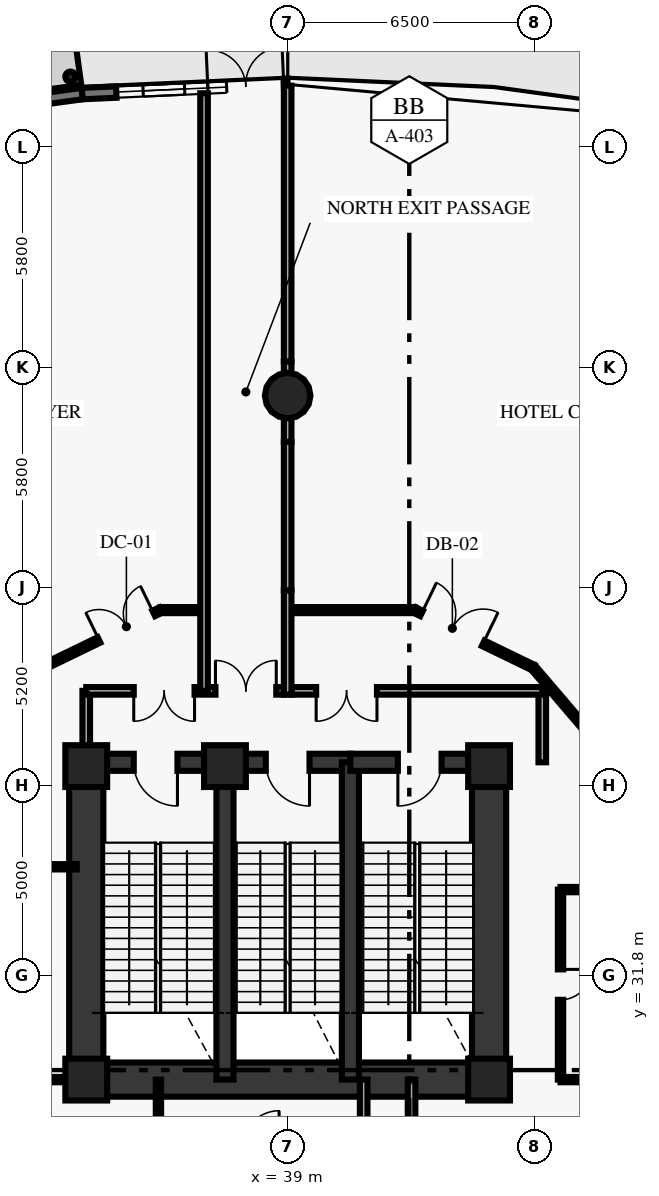
"""IFC4 building model, lengths in metres.
Left out: names, types, materials, properties, quantities, classifications, styles, units other than length and angle.
Written with IfcOpenShell. Run it as: python <this file> out.ifc"""

import sys

from ifc_helpers import new_model, si_unit, direction, frame, frame_2d, origin, origin_2d, place, context, subcontext, project, spatial, rectangle, circle, hollow_circle, extrude, element, fill, save


model = new_model("IFC4")
c1 = context("Model", 3, precision=1e-05, world=origin(), true_north=direction((0.0, 1.0)))
c2 = subcontext(c1, "Body", "Model", "MODEL_VIEW")
j1 = project(units=[si_unit("LENGTHUNIT", "METRE"), si_unit("PLANEANGLEUNIT", "RADIAN")], contexts=[c1])
p1 = place(None, origin())
s1 = spatial("IfcSite", under=j1, at=p1, CompositionType="ELEMENT")
p2 = place(p1, origin())
s2 = spatial("IfcBuilding", under=s1, at=p2, CompositionType="ELEMENT")
p3 = place(p2, origin())
s3 = spatial("IfcBuildingStorey", under=s2, at=p3, CompositionType="ELEMENT", Elevation=0.0)
for number, where, z_axis, x_axis in (
    (1, (44.3, 29.05, 0.0), (0.0, 0.0, 1.0), (1.0, 0.0, 0.0)),
    (2, (44.3, 37.3, 0.0), (0.0, 0.0, 1.0), (1.0, 0.0, 0.0)),
    (3, (37.35, 37.3, 0.0), (0.0, 0.0, 1.0), (1.0, 0.0, 0.0)),
    (4, (33.7, 37.3, 0.0), (0.0, 0.0, 1.0), (1.0, 0.0, 0.0)),
    (5, (33.7, 29.05, 0.0), (0.0, 0.0, 1.0), (1.0, 0.0, 0.0)),
):
    element("IfcColumn", number, at=place(p3, frame(where, z_axis=z_axis, x_axis=x_axis)), inside=s3, PredefinedType="PILASTER", context=c2, shape_type="SweptSolid", body=[
        extrude(rectangle(XDim=1.1, YDim=1.1, at=origin_2d()), origin(), (0.0, 0.0, 1.0), 5.7),
    ])
p4 = place(p3, frame((39.0, 47.05, 0.0), z_axis=(0.0, 0.0, 1.0), x_axis=(1.0, 0.0, 0.0)))
e6 = element("IfcColumn", 6, at=p4, inside=s3, PredefinedType="COLUMN", context=c2, shape_type="SweptSolid", body=[
    extrude(circle(Radius=0.6, at=origin_2d()), origin(), (0.0, 0.0, 1.0), 5.7),
])
for number, where, z_axis, x_axis in (
    (7, (33.7, 29.05, 0.0), (0.0, 0.0, 1.0), (0.0, 1.0, 0.0)),
    (8, (44.3, 29.05, 0.0), (0.0, 0.0, 1.0), (0.0, 1.0, 0.0)),
):
    element("IfcWall", number, at=place(p3, frame(where, z_axis=z_axis, x_axis=x_axis)), inside=s3, PredefinedType="SHEAR", context=c2, shape_type="SweptSolid", body=[
        extrude(rectangle(XDim=8.35, YDim=0.9, at=frame_2d((4.175, 0.0))), origin(), (0.0, 0.0, 1.0), 5.7),
    ])
p5 = place(p3, frame((33.7, 29.05, 0.0), z_axis=(0.0, 0.0, 1.0), x_axis=(1.0, 0.0, 0.0)))
e9 = element("IfcWall", 9, at=p5, inside=s3, PredefinedType="SHEAR", context=c2, shape_type="SweptSolid", body=[
    extrude(rectangle(XDim=10.6, YDim=0.9, at=frame_2d((5.3, 0.0))), origin(), (0.0, 0.0, 1.0), 5.7),
])
p6 = place(p3, frame((33.591, 54.997, 0.0), z_axis=(0.0, 0.0, 1.0), x_axis=(0.998993030562, 0.044865631479, 0.0)))
e10 = element("IfcWall", 10, at=p6, inside=s3, PredefinedType="STANDARD", context=c2, shape_type="SweptSolid", body=[
    extrude(rectangle(XDim=5.414, YDim=0.3, at=frame_2d((2.707, 0.0))), origin(), (0.0, 0.0, 1.0), 5.7),
])
p7 = place(p6, frame((0.9, 0.0, 0.9)))
e11 = element("IfcOpeningElement", 11, at=p7, cuts=e10, PredefinedType="OPENING", context=c2, shape_type="SweptSolid", body=[
    extrude(rectangle(XDim=1.8, YDim=2.4, at=frame_2d((0.9, 1.2))), frame((0.0, 0.16, 0.0), z_axis=(0.0, -1.0, 0.0), x_axis=(1.0, 0.0, 0.0)), (0.0, 0.0, 1.0), 0.32),
])
p8 = place(p6, frame((3.312, 0.0, 0.0)))
e12 = element("IfcOpeningElement", 12, at=p8, cuts=e10, PredefinedType="OPENING", context=c2, shape_type="SweptSolid", body=[
    extrude(rectangle(XDim=2.0, YDim=2.4, at=frame_2d((1.0, 1.2))), frame((0.0, 0.16, 0.0), z_axis=(0.0, -1.0, 0.0), x_axis=(1.0, 0.0, 0.0)), (0.0, 0.0, 1.0), 0.32),
])
p9 = place(p6, frame((1.607, 0.0, 3.4)))
e13 = element("IfcOpeningElement", 13, at=p9, cuts=e10, PredefinedType="OPENING", context=c2, shape_type="SweptSolid", body=[
    extrude(rectangle(XDim=2.2, YDim=1.3, at=frame_2d((1.1, 0.65))), frame((0.0, 0.16, 0.0), z_axis=(0.0, -1.0, 0.0), x_axis=(1.0, 0.0, 0.0)), (0.0, 0.0, 1.0), 0.32),
])
p10 = place(p3, frame((28.275, 54.271, 0.0), z_axis=(0.0, 0.0, 1.0), x_axis=(0.99080162659, 0.135322343857, 0.0)))
e14 = element("IfcWall", 14, at=p10, inside=s3, PredefinedType="STANDARD", context=c2, shape_type="SweptSolid", body=[
    extrude(rectangle(XDim=5.365, YDim=0.3, at=frame_2d((2.683, 0.0))), origin(), (0.0, 0.0, 1.0), 5.7),
])
p11 = place(p10, frame((1.683, 0.0, 0.0)))
e15 = element("IfcOpeningElement", 15, at=p11, cuts=e14, PredefinedType="OPENING", context=c2, shape_type="SweptSolid", body=[
    extrude(rectangle(XDim=2.0, YDim=2.4, at=frame_2d((1.0, 1.2))), frame((0.0, 0.16, 0.0), z_axis=(0.0, -1.0, 0.0), x_axis=(1.0, 0.0, 0.0)), (0.0, 0.0, 1.0), 0.32),
])
p12 = place(p10, frame((1.583, 0.0, 3.4)))
e16 = element("IfcOpeningElement", 16, at=p12, cuts=e14, PredefinedType="OPENING", context=c2, shape_type="SweptSolid", body=[
    extrude(rectangle(XDim=2.2, YDim=1.3, at=frame_2d((1.1, 0.65))), frame((0.0, 0.16, 0.0), z_axis=(0.0, -1.0, 0.0), x_axis=(1.0, 0.0, 0.0)), (0.0, 0.0, 1.0), 0.32),
])
p13 = place(p3, frame((33.286, 55.441, -0.22), z_axis=(0.0, 0.0, 1.0), x_axis=(1.0, 0.0, 0.0)))
e17 = element("IfcColumn", 17, at=p13, inside=s3, PredefinedType="COLUMN", context=c2, shape_type="SweptSolid", body=[
    extrude(hollow_circle(Radius=0.136, WallThickness=0.013, at=origin_2d()), origin(), (0.0, 0.0, 1.0), 3.47),
])
p14 = place(p3, frame((33.7, 37.4, 0.0), z_axis=(0.0, 0.0, 1.0), x_axis=(1.0, 0.0, 0.0)))
e18 = element("IfcWall", 18, at=p14, inside=s3, PredefinedType="SHEAR", context=c2, shape_type="SweptSolid", body=[
    extrude(rectangle(XDim=3.65, YDim=0.45, at=frame_2d((1.825, 0.0))), origin(), (0.0, 0.0, 1.0), 5.7),
])
p15 = place(p14, frame((1.25, 0.0, 0.0)))
e19 = element("IfcOpeningElement", 19, at=p15, cuts=e18, PredefinedType="OPENING", context=c2, shape_type="SweptSolid", body=[
    extrude(rectangle(XDim=1.15, YDim=2.15, at=frame_2d((0.575, 1.075))), frame((0.0, 0.235, 0.0), z_axis=(0.0, -1.0, 0.0), x_axis=(1.0, 0.0, 0.0)), (0.0, 0.0, 1.0), 0.47),
])
p16 = place(p3, frame((37.35, 29.05, 0.0), z_axis=(0.0, 0.0, 1.0), x_axis=(0.0, 1.0, 0.0)))
e20 = element("IfcWall", 20, at=p16, inside=s3, PredefinedType="SHEAR", context=c2, shape_type="SweptSolid", body=[
    extrude(rectangle(XDim=8.35, YDim=0.45, at=frame_2d((4.175, 0.0))), origin(), (0.0, 0.0, 1.0), 5.7),
])
p17 = place(p3, frame((37.35, 37.4, 0.0), z_axis=(0.0, 0.0, 1.0), x_axis=(1.0, 0.0, 0.0)))
e21 = element("IfcWall", 21, at=p17, inside=s3, PredefinedType="SHEAR", context=c2, shape_type="SweptSolid", body=[
    extrude(rectangle(XDim=3.3, YDim=0.45, at=frame_2d((1.65, 0.0))), origin(), (0.0, 0.0, 1.0), 5.7),
])
p18 = place(p17, frame((1.075, 0.0, 0.0)))
e22 = element("IfcOpeningElement", 22, at=p18, cuts=e21, PredefinedType="OPENING", context=c2, shape_type="SweptSolid", body=[
    extrude(rectangle(XDim=1.15, YDim=2.15, at=frame_2d((0.575, 1.075))), frame((0.0, 0.235, 0.0), z_axis=(0.0, -1.0, 0.0), x_axis=(1.0, 0.0, 0.0)), (0.0, 0.0, 1.0), 0.47),
])
p19 = place(p3, frame((40.65, 29.05, 0.0), z_axis=(0.0, 0.0, 1.0), x_axis=(0.0, 1.0, 0.0)))
e23 = element("IfcWall", 23, at=p19, inside=s3, PredefinedType="SHEAR", context=c2, shape_type="SweptSolid", body=[
    extrude(rectangle(XDim=8.35, YDim=0.45, at=frame_2d((4.175, 0.0))), origin(), (0.0, 0.0, 1.0), 5.7),
])
p20 = place(p3, frame((40.65, 37.4, 0.0), z_axis=(0.0, 0.0, 1.0), x_axis=(1.0, 0.0, 0.0)))
e24 = element("IfcWall", 24, at=p20, inside=s3, PredefinedType="SHEAR", context=c2, shape_type="SweptSolid", body=[
    extrude(rectangle(XDim=3.65, YDim=0.45, at=frame_2d((1.825, 0.0))), origin(), (0.0, 0.0, 1.0), 5.7),
])
p21 = place(p20, frame((1.25, 0.0, 0.0)))
e25 = element("IfcOpeningElement", 25, at=p21, cuts=e24, PredefinedType="OPENING", context=c2, shape_type="SweptSolid", body=[
    extrude(rectangle(XDim=1.15, YDim=2.15, at=frame_2d((0.575, 1.075))), frame((0.0, 0.235, 0.0), z_axis=(0.0, -1.0, 0.0), x_axis=(1.0, 0.0, 0.0)), (0.0, 0.0, 1.0), 0.47),
])
for number, where, z_axis, x_axis in (
    (26, (33.7, 37.4, 0.0), (0.0, 0.0, 1.0), (0.0, 1.0, 0.0)),
    (27, (45.7, 37.4, 0.0), (0.0, 0.0, 1.0), (0.0, 1.0, 0.0)),
):
    element("IfcWall", number, at=place(p3, frame(where, z_axis=z_axis, x_axis=x_axis)), inside=s3, PredefinedType="SOLIDWALL", context=c2, shape_type="SweptSolid", body=[
        extrude(rectangle(XDim=1.88, YDim=0.2, at=frame_2d((0.94, 0.0))), origin(), (0.0, 0.0, 1.0), 5.7),
    ])
p22 = place(p3, frame((33.7, 39.28, 0.0), z_axis=(0.0, 0.0, 1.0), x_axis=(1.0, 0.0, 0.0)))
e28 = element("IfcWall", 28, at=p22, inside=s3, PredefinedType="SOLIDWALL", context=c2, shape_type="SweptSolid", body=[
    extrude(rectangle(XDim=5.2, YDim=0.2, at=frame_2d((2.6, 0.0))), origin(), (0.0, 0.0, 1.0), 5.7),
])
p23 = place(p22, frame((1.25, 0.0, 0.0)))
e29 = element("IfcOpeningElement", 29, at=p23, cuts=e28, PredefinedType="OPENING", context=c2, shape_type="SweptSolid", body=[
    extrude(rectangle(XDim=1.6, YDim=2.2, at=frame_2d((0.8, 1.1))), frame((0.0, 0.11, 0.0), z_axis=(0.0, -1.0, 0.0), x_axis=(1.0, 0.0, 0.0)), (0.0, 0.0, 1.0), 0.22),
])
p24 = place(p22, frame((3.4, 0.0, 0.0)))
e30 = element("IfcOpeningElement", 30, at=p24, cuts=e28, PredefinedType="OPENING", context=c2, shape_type="SweptSolid", body=[
    extrude(rectangle(XDim=1.6, YDim=2.2, at=frame_2d((0.8, 1.1))), frame((0.0, 0.11, 0.0), z_axis=(0.0, -1.0, 0.0), x_axis=(1.0, 0.0, 0.0)), (0.0, 0.0, 1.0), 0.22),
])
p25 = place(p3, frame((39.1, 39.28, 0.0), z_axis=(0.0, 0.0, 1.0), x_axis=(1.0, 0.0, 0.0)))
e31 = element("IfcWall", 31, at=p25, inside=s3, PredefinedType="SOLIDWALL", context=c2, shape_type="SweptSolid", body=[
    extrude(rectangle(XDim=6.6, YDim=0.2, at=frame_2d((3.3, 0.0))), origin(), (0.0, 0.0, 1.0), 5.7),
])
p26 = place(p25, frame((0.65, 0.0, 0.0)))
e32 = element("IfcOpeningElement", 32, at=p26, cuts=e31, PredefinedType="OPENING", context=c2, shape_type="SweptSolid", body=[
    extrude(rectangle(XDim=1.6, YDim=2.2, at=frame_2d((0.8, 1.1))), frame((0.0, 0.11, 0.0), z_axis=(0.0, -1.0, 0.0), x_axis=(1.0, 0.0, 0.0)), (0.0, 0.0, 1.0), 0.22),
])
p27 = place(p3, frame((35.6, 27.28, 0.0), z_axis=(0.0, 0.0, 1.0), x_axis=(0.0, 1.0, 0.0)))
e33 = element("IfcWall", 33, at=p27, inside=s3, PredefinedType="PARTITIONING", context=c2, shape_type="SweptSolid", body=[
    extrude(rectangle(XDim=1.77, YDim=0.14, at=frame_2d((0.885, 0.0))), origin(), (0.0, 0.0, 1.0), 5.7),
])
for number, where, z_axis, x_axis in (
    (34, (41.0, 27.28, 0.0), (0.0, 0.0, 1.0), (0.0, 1.0, 0.0)),
    (35, (42.26, 27.28, 0.0), (0.0, 0.0, 1.0), (0.0, 1.0, 0.0)),
):
    element("IfcWall", number, at=place(p3, frame(where, z_axis=z_axis, x_axis=x_axis)), inside=s3, PredefinedType="SOLIDWALL", context=c2, shape_type="SweptSolid", body=[
        extrude(rectangle(XDim=1.77, YDim=0.2, at=frame_2d((0.885, 0.0))), origin(), (0.0, 0.0, 1.0), 5.7),
    ])
p28 = place(p3, frame((30.85, 29.05, 0.0), z_axis=(0.0, 0.0, 1.0), x_axis=(1.0, 0.0, 0.0)))
e36 = element("IfcWall", 36, at=p28, inside=s3, PredefinedType="PARTITIONING", context=c2, shape_type="SweptSolid", body=[
    extrude(rectangle(XDim=2.6, YDim=0.14, at=frame_2d((1.3, 0.0))), origin(), (0.0, 0.0, 1.0), 4.66),
])
p29 = place(p28, frame((0.9, 0.0, 0.0)))
e37 = element("IfcOpeningElement", 37, at=p29, cuts=e36, PredefinedType="OPENING", context=c2, shape_type="SweptSolid", body=[
    extrude(rectangle(XDim=0.8, YDim=2.05, at=frame_2d((0.4, 1.025))), frame((0.0, 0.08, 0.0), z_axis=(0.0, -1.0, 0.0), x_axis=(1.0, 0.0, 0.0)), (0.0, 0.0, 1.0), 0.16),
])
p30 = place(p3, frame((30.85, 34.65, 0.0), z_axis=(0.0, 0.0, 1.0), x_axis=(1.0, 0.0, 0.0)))
e38 = element("IfcWall", 38, at=p30, inside=s3, PredefinedType="PARTITIONING", context=c2, shape_type="SweptSolid", body=[
    extrude(rectangle(XDim=2.6, YDim=0.14, at=frame_2d((1.3, 0.0))), origin(), (0.0, 0.0, 1.0), 5.7),
])
p31 = place(p3, frame((46.18, 34.05, 0.0), z_axis=(0.0, 0.0, 1.0), x_axis=(0.0, -1.0, 0.0)))
e39 = element("IfcWall", 39, at=p31, inside=s3, PredefinedType="PARTITIONING", context=c2, shape_type="SweptSolid", body=[
    extrude(rectangle(XDim=5.0, YDim=0.14, at=frame_2d((2.5, 0.0))), origin(), (0.0, 0.0, 1.0), 5.7),
])
p32 = place(p31, frame((2.1, 0.0, 0.0)))
e40 = element("IfcOpeningElement", 40, at=p32, cuts=e39, PredefinedType="OPENING", context=c2, shape_type="SweptSolid", body=[
    extrude(rectangle(XDim=0.8, YDim=2.05, at=frame_2d((0.4, 1.025))), frame((0.0, 0.08, 0.0), z_axis=(0.0, -1.0, 0.0), x_axis=(1.0, 0.0, 0.0)), (0.0, 0.0, 1.0), 0.16),
])
p33 = place(p3, frame((46.18, 29.05, 0.0), z_axis=(0.0, 0.0, 1.0), x_axis=(1.0, 0.0, 0.0)))
e41 = element("IfcWall", 41, at=p33, inside=s3, PredefinedType="PARTITIONING", context=c2, shape_type="SweptSolid", body=[
    extrude(rectangle(XDim=0.59, YDim=0.14, at=frame_2d((0.295, 0.0))), origin(), (0.0, 0.0, 1.0), 4.66),
])
p34 = place(p3, frame((46.18, 34.05, 0.0), z_axis=(0.0, 0.0, 1.0), x_axis=(1.0, 0.0, 0.0)))
e42 = element("IfcWall", 42, at=p34, inside=s3, PredefinedType="PARTITIONING", context=c2, shape_type="SweptSolid", body=[
    extrude(rectangle(XDim=1.64, YDim=0.14, at=frame_2d((0.82, 0.0))), origin(), (0.0, 0.0, 1.0), 5.7),
])
p35 = place(p3, frame((50.189, 34.36, 0.0), z_axis=(0.0, 0.0, 1.0), x_axis=(-0.649652680018, 0.760231145998, 0.0)))
e43 = element("IfcWall", 43, at=p35, inside=s3, PredefinedType="PARTITIONING", context=c2, shape_type="SweptSolid", body=[
    extrude(rectangle(XDim=7.279, YDim=0.16, at=frame_2d((3.64, 0.0))), origin(), (0.0, 0.0, 1.0), 5.7),
])
p36 = place(p3, frame((42.344, 41.405, 0.0), z_axis=(0.0, 0.0, 1.0), x_axis=(0.899789784655, -0.436323668199, 0.0)))
e44 = element("IfcWall", 44, at=p36, inside=s3, PredefinedType="PARTITIONING", context=c2, shape_type="SweptSolid", body=[
    extrude(rectangle(XDim=3.463, YDim=0.16, at=frame_2d((1.731, 0.0))), origin(), (0.0, 0.0, 1.0), 5.7),
])
p37 = place(p36, frame((0.2, 0.0, 0.0)))
e45 = element("IfcOpeningElement", 45, at=p37, cuts=e44, PredefinedType="OPENING", context=c2, shape_type="SweptSolid", body=[
    extrude(rectangle(XDim=1.8, YDim=2.3, at=frame_2d((0.9, 1.15))), frame((0.0, 0.09, 0.0), z_axis=(0.0, -1.0, 0.0), x_axis=(1.0, 0.0, 0.0)), (0.0, 0.0, 1.0), 0.18),
])
p38 = place(p3, frame((32.54, 39.894, 0.0), z_axis=(0.0, 0.0, 1.0), x_axis=(0.899789784655, 0.436323668199, 0.0)))
e46 = element("IfcWall", 46, at=p38, inside=s3, PredefinedType="PARTITIONING", context=c2, shape_type="SweptSolid", body=[
    extrude(rectangle(XDim=3.463, YDim=0.16, at=frame_2d((1.731, 0.0))), origin(), (0.0, 0.0, 1.0), 5.7),
])
p39 = place(p38, frame((1.663, 0.0, 0.0)))
e47 = element("IfcOpeningElement", 47, at=p39, cuts=e46, PredefinedType="OPENING", context=c2, shape_type="SweptSolid", body=[
    extrude(rectangle(XDim=1.6, YDim=2.2, at=frame_2d((0.8, 1.1))), frame((0.0, 0.09, 0.0), z_axis=(0.0, -1.0, 0.0), x_axis=(1.0, 0.0, 0.0)), (0.0, 0.0, 1.0), 0.18),
])
p40 = place(p3, frame((39.0, 41.92, 0.0), z_axis=(0.0, 0.0, 1.0), x_axis=(0.0, 1.0, 0.0)))
e48 = element("IfcWall", 48, at=p40, inside=s3, PredefinedType="PARTITIONING", context=c2, shape_type="SweptSolid", body=[
    extrude(rectangle(XDim=3.913, YDim=0.2, at=frame_2d((1.957, 0.0))), origin(), (0.0, 0.0, 1.0), 5.7),
])
p41 = place(p3, frame((39.0, 45.833, 0.0), z_axis=(0.0, 0.0, 1.0), x_axis=(0.0, 1.0, 0.0)))
e49 = element("IfcWall", 49, at=p41, inside=s3, PredefinedType="PARTITIONING", context=c2, shape_type="SweptSolid", body=[
    extrude(rectangle(XDim=1.234, YDim=0.2, at=frame_2d((0.617, 0.0))), origin(), (0.0, 0.0, 1.0), 5.165),
])
p42 = place(p3, frame((39.0, 47.067, 0.0), z_axis=(0.0, 0.0, 1.0), x_axis=(0.0, 1.0, 0.0)))
e50 = element("IfcWall", 50, at=p42, inside=s3, PredefinedType="PARTITIONING", context=c2, shape_type="SweptSolid", body=[
    extrude(rectangle(XDim=0.883, YDim=0.2, at=frame_2d((0.441, 0.0))), origin(), (0.0, 0.0, 1.0), 5.7),
])
p43 = place(p3, frame((39.0, 47.95, 0.0), z_axis=(0.0, 0.0, 1.0), x_axis=(0.0, 1.0, 0.0)))
e51 = element("IfcWall", 51, at=p43, inside=s3, PredefinedType="PARTITIONING", context=c2, shape_type="SweptSolid", body=[
    extrude(rectangle(XDim=7.255, YDim=0.2, at=frame_2d((3.627, 0.0))), origin(), (0.0, 0.0, 1.0), 5.7),
])
p44 = place(p3, frame((42.344, 41.405, 0.0), z_axis=(0.0, 0.0, 1.0), x_axis=(-1.0, 0.0, 0.0)))
e52 = element("IfcWall", 52, at=p44, inside=s3, PredefinedType="PARTITIONING", context=c2, shape_type="SweptSolid", body=[
    extrude(rectangle(XDim=3.344, YDim=0.16, at=frame_2d((1.672, 0.0))), origin(), (0.0, 0.0, 1.0), 5.7),
])
p45 = place(p3, frame((36.8, 41.405, 0.0), z_axis=(0.0, 0.0, 1.0), x_axis=(-1.0, 0.0, 0.0)))
e53 = element("IfcWall", 53, at=p45, inside=s3, PredefinedType="PARTITIONING", context=c2, shape_type="SweptSolid", body=[
    extrude(rectangle(XDim=1.144, YDim=0.16, at=frame_2d((0.572, 0.0))), origin(), (0.0, 0.0, 1.0), 5.7),
])
p46 = place(p3, frame((39.0, 39.18, 0.0), z_axis=(0.0, 0.0, 1.0), x_axis=(0.0, 1.0, 0.0)))
e54 = element("IfcWall", 54, at=p46, inside=s3, PredefinedType="SOLIDWALL", context=c2, shape_type="SweptSolid", body=[
    extrude(rectangle(XDim=2.74, YDim=0.2, at=frame_2d((1.37, 0.0))), origin(), (0.0, 0.0, 1.0), 5.7),
])
p47 = place(p3, frame((36.8, 39.28, 0.0), z_axis=(0.0, 0.0, 1.0), x_axis=(0.0, 1.0, 0.0)))
e55 = element("IfcWall", 55, at=p47, inside=s3, PredefinedType="SOLIDWALL", context=c2, shape_type="SweptSolid", body=[
    extrude(rectangle(XDim=15.726, YDim=0.2, at=frame_2d((7.863, 0.0))), origin(), (0.0, 0.0, 1.0), 5.7),
])
p48 = place(p7, origin())
e56 = element("IfcWindow", 56, at=p48, inside=s3, PartitioningType="DOUBLE_PANEL_VERTICAL", PredefinedType="WINDOW", context=c2, shape_type="SweptSolid", body=[
    extrude(rectangle(XDim=1.8, YDim=2.4, at=frame_2d((0.9, 1.2))), frame((0.0, 0.03, 0.0), z_axis=(0.0, -1.0, 0.0), x_axis=(1.0, 0.0, 0.0)), (0.0, 0.0, 1.0), 0.06),
])
fill(e11, e56)
p49 = place(p8, origin())
e57 = element("IfcDoor", 57, at=p49, inside=s3, OperationType="DOUBLE_DOOR_SINGLE_SWING", PredefinedType="DOOR", context=c2, shape_type="SweptSolid", body=[
    extrude(rectangle(XDim=2.0, YDim=2.4, at=frame_2d((1.0, 1.2))), frame((0.0, 0.025, 0.0), z_axis=(0.0, -1.0, 0.0), x_axis=(1.0, 0.0, 0.0)), (0.0, 0.0, 1.0), 0.05),
])
fill(e12, e57)
p50 = place(p9, origin())
e58 = element("IfcWindow", 58, at=p50, inside=s3, PartitioningType="DOUBLE_PANEL_HORIZONTAL", PredefinedType="WINDOW", context=c2, shape_type="SweptSolid", body=[
    extrude(rectangle(XDim=2.2, YDim=1.3, at=frame_2d((1.1, 0.65))), frame((0.0, 0.03, 0.0), z_axis=(0.0, -1.0, 0.0), x_axis=(1.0, 0.0, 0.0)), (0.0, 0.0, 1.0), 0.06),
])
fill(e13, e58)
p51 = place(p15, origin())
e59 = element("IfcDoor", 59, at=p51, inside=s3, OperationType="SINGLE_SWING_RIGHT", PredefinedType="DOOR", context=c2, shape_type="SweptSolid", body=[
    extrude(rectangle(XDim=1.15, YDim=2.15, at=frame_2d((0.575, 1.075))), frame((0.0, 0.025, 0.0), z_axis=(0.0, -1.0, 0.0), x_axis=(1.0, 0.0, 0.0)), (0.0, 0.0, 1.0), 0.05),
])
fill(e19, e59)
p52 = place(p18, origin())
e60 = element("IfcDoor", 60, at=p52, inside=s3, OperationType="SINGLE_SWING_RIGHT", PredefinedType="DOOR", context=c2, shape_type="SweptSolid", body=[
    extrude(rectangle(XDim=1.15, YDim=2.15, at=frame_2d((0.575, 1.075))), frame((0.0, 0.025, 0.0), z_axis=(0.0, -1.0, 0.0), x_axis=(1.0, 0.0, 0.0)), (0.0, 0.0, 1.0), 0.05),
])
fill(e22, e60)
p53 = place(p21, origin())
e61 = element("IfcDoor", 61, at=p53, inside=s3, OperationType="SINGLE_SWING_LEFT", PredefinedType="DOOR", context=c2, shape_type="SweptSolid", body=[
    extrude(rectangle(XDim=1.15, YDim=2.15, at=frame_2d((0.575, 1.075))), frame((0.0, 0.025, 0.0), z_axis=(0.0, -1.0, 0.0), x_axis=(1.0, 0.0, 0.0)), (0.0, 0.0, 1.0), 0.05),
])
fill(e25, e61)
p54 = place(p23, origin())
e62 = element("IfcDoor", 62, at=p54, inside=s3, OperationType="DOUBLE_DOOR_SINGLE_SWING", PredefinedType="DOOR", context=c2, shape_type="SweptSolid", body=[
    extrude(rectangle(XDim=1.6, YDim=2.2, at=frame_2d((0.8, 1.1))), frame((0.0, 0.025, 0.0), z_axis=(0.0, -1.0, 0.0), x_axis=(1.0, 0.0, 0.0)), (0.0, 0.0, 1.0), 0.05),
])
fill(e29, e62)
p55 = place(p24, origin())
e63 = element("IfcDoor", 63, at=p55, inside=s3, OperationType="DOUBLE_DOOR_SINGLE_SWING", PredefinedType="DOOR", context=c2, shape_type="SweptSolid", body=[
    extrude(rectangle(XDim=1.6, YDim=2.2, at=frame_2d((0.8, 1.1))), frame((0.0, 0.025, 0.0), z_axis=(0.0, -1.0, 0.0), x_axis=(1.0, 0.0, 0.0)), (0.0, 0.0, 1.0), 0.05),
])
fill(e30, e63)
p56 = place(p26, origin())
e64 = element("IfcDoor", 64, at=p56, inside=s3, OperationType="DOUBLE_DOOR_SINGLE_SWING", PredefinedType="DOOR", context=c2, shape_type="SweptSolid", body=[
    extrude(rectangle(XDim=1.6, YDim=2.2, at=frame_2d((0.8, 1.1))), frame((0.0, 0.025, 0.0), z_axis=(0.0, -1.0, 0.0), x_axis=(1.0, 0.0, 0.0)), (0.0, 0.0, 1.0), 0.05),
])
fill(e32, e64)
p57 = place(p32, origin())
e65 = element("IfcDoor", 65, at=p57, inside=s3, OperationType="SINGLE_SWING_LEFT", PredefinedType="DOOR", context=c2, shape_type="SweptSolid", body=[
    extrude(rectangle(XDim=0.8, YDim=2.05, at=frame_2d((0.4, 1.025))), frame((0.0, 0.025, 0.0), z_axis=(0.0, -1.0, 0.0), x_axis=(1.0, 0.0, 0.0)), (0.0, 0.0, 1.0), 0.05),
])
fill(e40, e65)
p58 = place(p37, origin())
e66 = element("IfcDoor", 66, at=p58, inside=s3, OperationType="DOUBLE_DOOR_SINGLE_SWING", PredefinedType="DOOR", context=c2, shape_type="SweptSolid", body=[
    extrude(rectangle(XDim=1.8, YDim=2.3, at=frame_2d((0.9, 1.15))), frame((0.0, 0.025, 0.0), z_axis=(0.0, -1.0, 0.0), x_axis=(1.0, 0.0, 0.0)), (0.0, 0.0, 1.0), 0.05),
])
fill(e45, e66)
p59 = place(p39, origin())
e67 = element("IfcDoor", 67, at=p59, inside=s3, OperationType="DOUBLE_DOOR_SINGLE_SWING", PredefinedType="DOOR", context=c2, shape_type="SweptSolid", body=[
    extrude(rectangle(XDim=1.6, YDim=2.2, at=frame_2d((0.8, 1.1))), frame((0.0, 0.025, 0.0), z_axis=(0.0, -1.0, 0.0), x_axis=(1.0, 0.0, 0.0)), (0.0, 0.0, 1.0), 0.05),
])
fill(e47, e67)
save(model, sys.argv[1])
